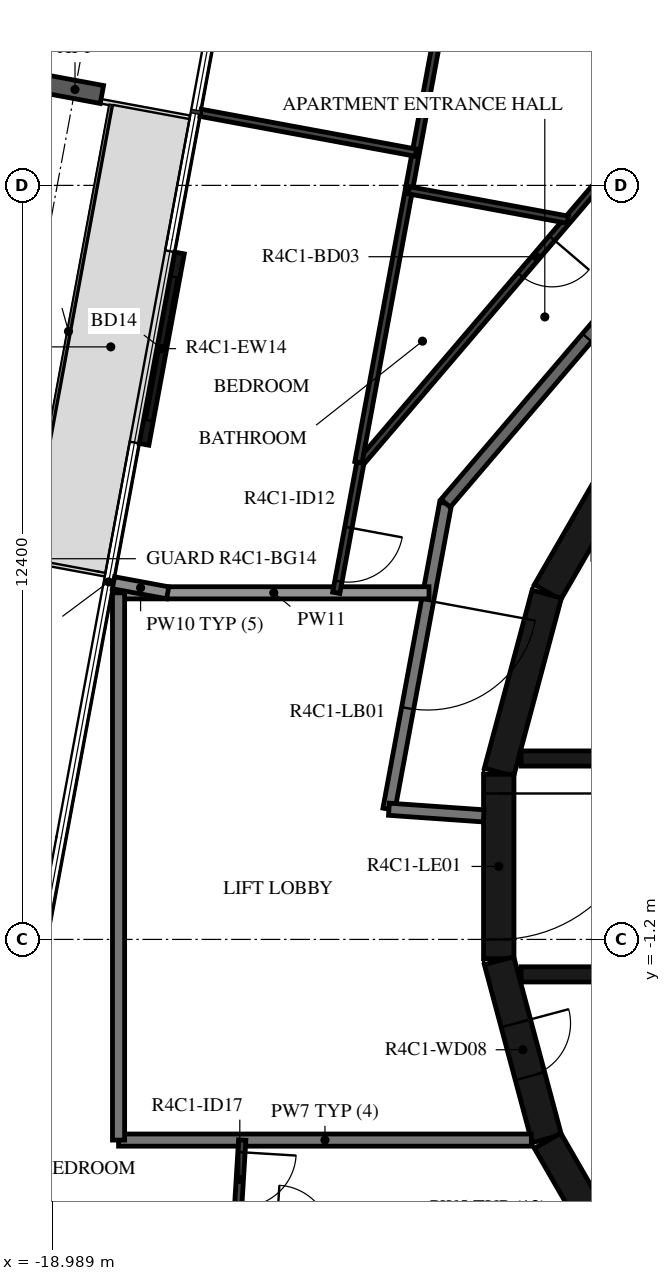
"""IFC4 building model, lengths in metres.
Left out: names, types, materials, properties, quantities, classifications, styles, units other than length and angle.
Written with IfcOpenShell. Run it as: python <this file> out.ifc"""

import sys

from ifc_helpers import new_model, si_unit, direction, frame, frame_2d, origin, origin_2d, place, context, subcontext, project, spatial, rectangle, i_section, extrude, element, fill, save


model = new_model("IFC4")
c1 = context("Model", 3, precision=1e-05, world=origin(), true_north=direction((0.0, 1.0)))
c2 = subcontext(c1, "Body", "Model", "MODEL_VIEW")
j1 = project(units=[si_unit("LENGTHUNIT", "METRE"), si_unit("PLANEANGLEUNIT", "RADIAN")], contexts=[c1])
p1 = place(None, origin())
s1 = spatial("IfcSite", under=j1, at=p1, CompositionType="ELEMENT")
p2 = place(p1, origin())
s2 = spatial("IfcBuilding", under=s1, at=p2, CompositionType="ELEMENT")
p3 = place(p2, frame((0.0, 0.0, 176.2)))
s3 = spatial("IfcBuildingStorey", under=s2, at=p3, CompositionType="ELEMENT", Elevation=176.2)
p4 = place(p3, frame((-18.616, 12.777, -0.38), z_axis=(0.0, 0.0, 1.0), x_axis=(0.182235967681, 0.983254825609, 0.0)))
e1 = element("IfcColumn", 1, at=p4, inside=s3, PredefinedType="COLUMN", context=c2, shape_type="SweptSolid", body=[
    extrude(i_section(OverallWidth=0.3, OverallDepth=0.9, WebThickness=0.019, FlangeThickness=0.035, FilletRadius=0.03, at=origin_2d()), origin(), (0.0, 0.0, 1.0), 3.5),
])
p5 = place(p3, frame((-16.897, 10.088, 0.0), z_axis=(0.0, 0.0, 1.0), x_axis=(-0.18226136951, -0.983250117307, 0.0)))
e2 = element("IfcWall", 2, at=p5, inside=s3, PredefinedType="STANDARD", context=c2, shape_type="SweptSolid", body=[
    extrude(rectangle(XDim=3.2, YDim=0.16, at=frame_2d((1.6, 0.0))), origin(), (0.0, 0.0, 1.0), 3.12),
])
p6 = place(p5, frame((0.4, 0.0, 0.0)))
e3 = element("IfcOpeningElement", 3, at=p6, cuts=e2, PredefinedType="OPENING", context=c2, shape_type="SweptSolid", body=[
    extrude(rectangle(XDim=2.4, YDim=2.4, at=frame_2d((1.2, 1.2))), frame((0.0, 0.09, 0.0), z_axis=(0.0, -1.0, 0.0), x_axis=(1.0, 0.0, 0.0)), (0.0, 0.0, 1.0), 0.18),
])
for number, where, z_axis, x_axis in (
    (4, (-9.329, 7.137, 0.0), (0.0, 0.0, 1.0), (-0.5, -0.866, 0.0)),
    (5, (-10.858, 4.479, 0.0), (0.0, 0.0, 1.0), (-0.259, -0.966, 0.0)),
):
    element("IfcWall", number, at=place(p3, frame(where, z_axis=z_axis, x_axis=x_axis)), inside=s3, PredefinedType="SHEAR", context=c2, shape_type="SweptSolid", body=[
        extrude(rectangle(XDim=3.033, YDim=0.5, at=frame_2d((1.516, 0.0))), origin(), (0.0, 0.0, 1.0), 3.12),
    ])
p7 = place(p3, frame((-11.647, 1.516, 0.0), z_axis=(0.0, 0.0, 1.0), x_axis=(0.0, -1.0, 0.0)))
e6 = element("IfcWall", 6, at=p7, inside=s3, PredefinedType="SHEAR", context=c2, shape_type="SweptSolid", body=[
    extrude(rectangle(XDim=3.033, YDim=0.5, at=frame_2d((1.516, 0.0))), origin(), (0.0, 0.0, 1.0), 3.12),
])
p8 = place(p7, frame((0.316, 0.0, 0.0)))
e7 = element("IfcOpeningElement", 7, at=p8, cuts=e6, PredefinedType="OPENING", context=c2, shape_type="SweptSolid", body=[
    extrude(rectangle(XDim=2.4, YDim=2.1, at=frame_2d((1.2, 1.05))), frame((0.0, 0.26, 0.0), z_axis=(0.0, -1.0, 0.0), x_axis=(1.0, 0.0, 0.0)), (0.0, 0.0, 1.0), 0.52),
])
p9 = place(p3, frame((-11.643, -1.55, 0.0), z_axis=(0.0, 0.0, 1.0), x_axis=(0.258734743916, -0.965948410781, 0.0)))
e8 = element("IfcWall", 8, at=p9, inside=s3, PredefinedType="SHEAR", context=c2, shape_type="SweptSolid", body=[
    extrude(rectangle(XDim=3.033, YDim=0.5, at=frame_2d((1.516, 0.0))), origin(), (0.0, 0.0, 1.0), 3.12),
])
p10 = place(p9, frame((1.066, 0.0, 0.0)))
e9 = element("IfcOpeningElement", 9, at=p10, cuts=e8, PredefinedType="OPENING", context=c2, shape_type="SweptSolid", body=[
    extrude(rectangle(XDim=0.9, YDim=2.1, at=frame_2d((0.45, 1.05))), frame((0.0, 0.26, 0.0), z_axis=(0.0, -1.0, 0.0), x_axis=(1.0, 0.0, 0.0)), (0.0, 0.0, 1.0), 0.52),
])
p11 = place(p3, frame((-10.845, -4.51, 0.0), z_axis=(0.0, 0.0, 1.0), x_axis=(0.500087131594, -0.865975092491, 0.0)))
e10 = element("IfcWall", 10, at=p11, inside=s3, PredefinedType="SHEAR", context=c2, shape_type="SweptSolid", body=[
    extrude(rectangle(XDim=3.033, YDim=0.5, at=frame_2d((1.516, 0.0))), origin(), (0.0, 0.0, 1.0), 3.12),
])
p12 = place(p3, frame((-11.28, 1.775, 0.0), z_axis=(0.0, 0.0, 1.0), x_axis=(1.0, 0.0, 0.0)))
e11 = element("IfcWall", 11, at=p12, inside=s3, PredefinedType="SHEAR", context=c2, shape_type="SweptSolid", body=[
    extrude(rectangle(XDim=14.38, YDim=0.25, at=frame_2d((7.19, 0.0))), origin(), (0.0, 0.0, 1.0), 3.12),
])
p13 = place(p12, frame((10.73, 0.0, 0.0)))
e12 = element("IfcOpeningElement", 12, at=p13, cuts=e11, PredefinedType="OPENING", context=c2, shape_type="SweptSolid", body=[
    extrude(rectangle(XDim=1.1, YDim=2.1, at=frame_2d((0.55, 1.05))), frame((0.0, 0.135, 0.0), z_axis=(0.0, -1.0, 0.0), x_axis=(1.0, 0.0, 0.0)), (0.0, 0.0, 1.0), 0.27),
])
p14 = place(p12, frame((12.88, 0.0, 0.0)))
e13 = element("IfcOpeningElement", 13, at=p14, cuts=e11, PredefinedType="OPENING", context=c2, shape_type="SweptSolid", body=[
    extrude(rectangle(XDim=1.1, YDim=2.1, at=frame_2d((0.55, 1.05))), frame((0.0, 0.135, 0.0), z_axis=(0.0, -1.0, 0.0), x_axis=(1.0, 0.0, 0.0)), (0.0, 0.0, 1.0), 0.27),
])
p15 = place(p12, frame((5.455, 0.0, 0.0)))
e14 = element("IfcOpeningElement", 14, at=p15, cuts=e11, PredefinedType="OPENING", context=c2, shape_type="SweptSolid", body=[
    extrude(rectangle(XDim=0.9, YDim=2.1, at=frame_2d((0.45, 1.05))), frame((0.0, 0.135, 0.0), z_axis=(0.0, -1.0, 0.0), x_axis=(1.0, 0.0, 0.0)), (0.0, 0.0, 1.0), 0.27),
])
p16 = place(p3, frame((-11.28, -1.775, 0.0), z_axis=(0.0, 0.0, 1.0), x_axis=(1.0, 0.0, 0.0)))
e15 = element("IfcWall", 15, at=p16, inside=s3, PredefinedType="SHEAR", context=c2, shape_type="SweptSolid", body=[
    extrude(rectangle(XDim=14.38, YDim=0.25, at=frame_2d((7.19, 0.0))), origin(), (0.0, 0.0, 1.0), 3.12),
])
p17 = place(p16, frame((12.88, 0.0, 0.0)))
e16 = element("IfcOpeningElement", 16, at=p17, cuts=e15, PredefinedType="OPENING", context=c2, shape_type="SweptSolid", body=[
    extrude(rectangle(XDim=1.1, YDim=2.1, at=frame_2d((0.55, 1.05))), frame((0.0, 0.135, 0.0), z_axis=(0.0, -1.0, 0.0), x_axis=(1.0, 0.0, 0.0)), (0.0, 0.0, 1.0), 0.27),
])
p18 = place(p16, frame((8.68, 0.0, 0.0)))
e17 = element("IfcOpeningElement", 17, at=p18, cuts=e15, PredefinedType="OPENING", context=c2, shape_type="SweptSolid", body=[
    extrude(rectangle(XDim=0.9, YDim=2.1, at=frame_2d((0.45, 1.05))), frame((0.0, 0.135, 0.0), z_axis=(0.0, -1.0, 0.0), x_axis=(1.0, 0.0, 0.0)), (0.0, 0.0, 1.0), 0.27),
])
p19 = place(p3, frame((-12.521, 5.972, 0.0), z_axis=(0.0, 0.0, 1.0), x_axis=(-0.182251559718, -0.983251935661, 0.0)))
e18 = element("IfcWall", 18, at=p19, inside=s3, PredefinedType="STANDARD", context=c2, shape_type="SweptSolid", body=[
    extrude(rectangle(XDim=5.117, YDim=0.2, at=frame_2d((2.559, 0.0))), origin(), (0.0, 0.0, 1.0), 3.12),
])
p20 = place(p19, frame((1.627, 0.0, 0.0)))
e19 = element("IfcOpeningElement", 19, at=p20, cuts=e18, PredefinedType="OPENING", context=c2, shape_type="SweptSolid", body=[
    extrude(rectangle(XDim=1.8, YDim=2.1, at=frame_2d((0.9, 1.05))), frame((0.0, 0.11, 0.0), z_axis=(0.0, -1.0, 0.0), x_axis=(1.0, 0.0, 0.0)), (0.0, 0.0, 1.0), 0.22),
])
p21 = place(p3, frame((-13.454, 0.941, 0.0), z_axis=(0.0, 0.0, 1.0), x_axis=(0.99755155062, -0.069934997354, 0.0)))
e20 = element("IfcWall", 20, at=p21, inside=s3, PredefinedType="STANDARD", context=c2, shape_type="SweptSolid", body=[
    extrude(rectangle(XDim=1.561, YDim=0.2, at=frame_2d((0.78, 0.0))), origin(), (0.0, 0.0, 1.0), 3.12),
])
p22 = place(p3, frame((-7.858, 11.433, 0.0), z_axis=(0.0, 0.0, 1.0), x_axis=(-0.649440801937, -0.760412154545, 0.0)))
e21 = element("IfcWall", 21, at=p22, inside=s3, PredefinedType="STANDARD", context=c2, shape_type="SweptSolid", body=[
    extrude(rectangle(XDim=7.181, YDim=0.2, at=frame_2d((3.59, 0.0))), origin(), (0.0, 0.0, 1.0), 3.12),
])
p23 = place(p22, frame((2.6, 0.0, 0.0)))
e22 = element("IfcOpeningElement", 22, at=p23, cuts=e21, PredefinedType="OPENING", context=c2, shape_type="SweptSolid", body=[
    extrude(rectangle(XDim=1.0, YDim=2.1, at=frame_2d((0.5, 1.05))), frame((0.0, 0.11, 0.0), z_axis=(0.0, -1.0, 0.0), x_axis=(1.0, 0.0, 0.0)), (0.0, 0.0, 1.0), 0.22),
])
p24 = place(p3, frame((-12.794, 4.5, 0.0), z_axis=(0.0, 0.0, 1.0), x_axis=(-1.0, 0.0, 0.0)))
e23 = element("IfcWall", 23, at=p24, inside=s3, PredefinedType="STANDARD", context=c2, shape_type="SweptSolid", body=[
    extrude(rectangle(XDim=5.106, YDim=0.2, at=frame_2d((2.553, 0.0))), origin(), (0.0, 0.0, 1.0), 2.73),
])
p25 = place(p3, frame((-17.9, -4.5, 0.0), z_axis=(0.0, 0.0, 1.0), x_axis=(1.0, 0.0, 0.0)))
e24 = element("IfcWall", 24, at=p25, inside=s3, PredefinedType="STANDARD", context=c2, shape_type="SweptSolid", body=[
    extrude(rectangle(XDim=6.789, YDim=0.2, at=frame_2d((3.394, 0.0))), origin(), (0.0, 0.0, 1.0), 3.12),
])
p26 = place(p3, frame((-17.9, 4.5, 0.0), z_axis=(0.0, 0.0, 1.0), x_axis=(0.0, -1.0, 0.0)))
e25 = element("IfcWall", 25, at=p26, inside=s3, PredefinedType="STANDARD", context=c2, shape_type="SweptSolid", body=[
    extrude(rectangle(XDim=9.0, YDim=0.2, at=frame_2d((4.5, 0.0))), origin(), (0.0, 0.0, 1.0), 3.12),
])
p27 = place(p3, frame((-17.984, 4.665, 0.0), z_axis=(0.0, 0.0, 1.0), x_axis=(0.98328378843, -0.182079629313, 0.0)))
e26 = element("IfcWall", 26, at=p27, inside=s3, PredefinedType="STANDARD", context=c2, shape_type="SweptSolid", body=[
    extrude(rectangle(XDim=0.908, YDim=0.2, at=frame_2d((0.454, 0.0))), origin(), (0.0, 0.0, 1.0), 2.73),
])
p28 = place(p3, frame((-8.774, 12.669, 0.0), z_axis=(0.0, 0.0, 1.0), x_axis=(-0.649446157105, -0.760407580855, 0.0)))
e27 = element("IfcWall", 27, at=p28, inside=s3, PredefinedType="PARTITIONING", context=c2, shape_type="SweptSolid", body=[
    extrude(rectangle(XDim=7.927, YDim=0.12, at=frame_2d((3.964, 0.0))), origin(), (0.0, 0.0, 1.0), 3.12),
])
p29 = place(p28, frame((3.074, 0.0, 0.0)))
e28 = element("IfcOpeningElement", 28, at=p29, cuts=e27, PredefinedType="OPENING", context=c2, shape_type="SweptSolid", body=[
    extrude(rectangle(XDim=0.8, YDim=2.1, at=frame_2d((0.4, 1.05))), frame((0.0, 0.07, 0.0), z_axis=(0.0, -1.0, 0.0), x_axis=(1.0, 0.0, 0.0)), (0.0, 0.0, 1.0), 0.14),
])
p30 = place(p3, frame((-13.923, 6.641, 0.0), z_axis=(0.0, 0.0, 1.0), x_axis=(-0.182209715759, -0.983259690765, 0.0)))
e29 = element("IfcWall", 29, at=p30, inside=s3, PredefinedType="PARTITIONING", context=c2, shape_type="SweptSolid", body=[
    extrude(rectangle(XDim=2.177, YDim=0.12, at=frame_2d((1.089, 0.0))), origin(), (0.0, 0.0, 1.0), 3.12),
])
p31 = place(p30, frame((1.083, 0.0, 0.0)))
e30 = element("IfcOpeningElement", 30, at=p31, cuts=e29, PredefinedType="OPENING", context=c2, shape_type="SweptSolid", body=[
    extrude(rectangle(XDim=0.9, YDim=2.1, at=frame_2d((0.45, 1.05))), frame((0.0, 0.07, 0.0), z_axis=(0.0, -1.0, 0.0), x_axis=(1.0, 0.0, 0.0)), (0.0, 0.0, 1.0), 0.14),
])
p32 = place(p3, frame((-13.955, 6.647, 0.0), z_axis=(0.0, 0.0, 1.0), x_axis=(0.182264522222, 0.983249532896, 0.0)))
e31 = element("IfcWall", 31, at=p32, inside=s3, PredefinedType="PARTITIONING", context=c2, shape_type="SweptSolid", body=[
    extrude(rectangle(XDim=4.589, YDim=0.12, at=frame_2d((2.294, 0.0))), origin(), (0.0, 0.0, 1.0), 3.12),
])
p33 = place(p3, frame((-11.396, 20.453, 0.0), z_axis=(0.0, 0.0, 1.0), x_axis=(-0.182223370439, -0.983257160292, 0.0)))
e32 = element("IfcWall", 32, at=p33, inside=s3, PredefinedType="PARTITIONING", context=c2, shape_type="SweptSolid", body=[
    extrude(rectangle(XDim=9.452, YDim=0.12, at=frame_2d((4.726, 0.0))), origin(), (0.0, 0.0, 1.0), 3.12),
])
p34 = place(p33, frame((3.319, 0.0, 0.0)))
e33 = element("IfcOpeningElement", 33, at=p34, cuts=e32, PredefinedType="OPENING", context=c2, shape_type="SweptSolid", body=[
    extrude(rectangle(XDim=0.9, YDim=2.1, at=frame_2d((0.45, 1.05))), frame((0.0, 0.07, 0.0), z_axis=(0.0, -1.0, 0.0), x_axis=(1.0, 0.0, 0.0)), (0.0, 0.0, 1.0), 0.14),
])
p35 = place(p33, frame((0.2, 0.0, 0.0)))
e34 = element("IfcOpeningElement", 34, at=p35, cuts=e32, PredefinedType="OPENING", context=c2, shape_type="SweptSolid", body=[
    extrude(rectangle(XDim=0.9, YDim=2.1, at=frame_2d((0.45, 1.05))), frame((0.0, 0.07, 0.0), z_axis=(0.0, -1.0, 0.0), x_axis=(1.0, 0.0, 0.0)), (0.0, 0.0, 1.0), 0.14),
])
p36 = place(p3, frame((-13.126, 11.12, 0.0), z_axis=(0.0, 0.0, 1.0), x_axis=(0.983257646361, -0.182220747645, 0.0)))
e35 = element("IfcWall", 35, at=p36, inside=s3, PredefinedType="PARTITIONING", context=c2, shape_type="SweptSolid", body=[
    extrude(rectangle(XDim=2.659, YDim=0.12, at=frame_2d((1.33, 0.0))), origin(), (0.0, 0.0, 1.0), 3.12),
])
p37 = place(p3, frame((-16.552, 12.394, 0.0), z_axis=(0.0, 0.0, 1.0), x_axis=(0.983257712156, -0.182220392618, 0.0)))
e36 = element("IfcWall", 36, at=p37, inside=s3, PredefinedType="PARTITIONING", context=c2, shape_type="SweptSolid", body=[
    extrude(rectangle(XDim=3.6, YDim=0.12, at=frame_2d((1.8, 0.0))), origin(), (0.0, 0.0, 1.0), 2.73),
])
p38 = place(p3, frame((-15.866, -4.5, 0.0), z_axis=(0.0, 0.0, 1.0), x_axis=(-0.060986374837, -0.998138598635, 0.0)))
e37 = element("IfcWall", 37, at=p38, inside=s3, PredefinedType="PARTITIONING", context=c2, shape_type="SweptSolid", body=[
    extrude(rectangle(XDim=1.605, YDim=0.12, at=frame_2d((0.803, 0.0))), origin(), (0.0, 0.0, 1.0), 3.12),
])
p39 = place(p38, frame((0.2, 0.0, 0.0)))
e38 = element("IfcOpeningElement", 38, at=p39, cuts=e37, PredefinedType="OPENING", context=c2, shape_type="SweptSolid", body=[
    extrude(rectangle(XDim=0.9, YDim=2.1, at=frame_2d((0.45, 1.05))), frame((0.0, 0.07, 0.0), z_axis=(0.0, -1.0, 0.0), x_axis=(1.0, 0.0, 0.0)), (0.0, 0.0, 1.0), 0.14),
])
p40 = place(p6, origin())
e39 = element("IfcDoor", 39, at=p40, inside=s3, OperationType="DOUBLE_DOOR_SLIDING", PredefinedType="DOOR", context=c2, shape_type="SweptSolid", body=[
    extrude(rectangle(XDim=2.4, YDim=2.4, at=frame_2d((1.2, 1.2))), frame((0.0, 0.025, 0.0), z_axis=(0.0, -1.0, 0.0), x_axis=(1.0, 0.0, 0.0)), (0.0, 0.0, 1.0), 0.05),
])
fill(e3, e39)
p41 = place(p8, origin())
e40 = element("IfcDoor", 40, at=p41, inside=s3, OperationType="DOUBLE_DOOR_SINGLE_SWING", PredefinedType="DOOR", context=c2, shape_type="SweptSolid", body=[
    extrude(rectangle(XDim=2.4, YDim=2.1, at=frame_2d((1.2, 1.05))), frame((0.0, 0.025, 0.0), z_axis=(0.0, -1.0, 0.0), x_axis=(1.0, 0.0, 0.0)), (0.0, 0.0, 1.0), 0.05),
])
fill(e7, e40)
p42 = place(p10, origin())
e41 = element("IfcDoor", 41, at=p42, inside=s3, OperationType="SINGLE_SWING_RIGHT", PredefinedType="DOOR", context=c2, shape_type="SweptSolid", body=[
    extrude(rectangle(XDim=0.9, YDim=2.1, at=frame_2d((0.45, 1.05))), frame((0.0, 0.025, 0.0), z_axis=(0.0, -1.0, 0.0), x_axis=(1.0, 0.0, 0.0)), (0.0, 0.0, 1.0), 0.05),
])
fill(e9, e41)
p43 = place(p23, origin())
e42 = element("IfcDoor", 42, at=p43, inside=s3, OperationType="SINGLE_SWING_LEFT", PredefinedType="DOOR", context=c2, shape_type="SweptSolid", body=[
    extrude(rectangle(XDim=1.0, YDim=2.1, at=frame_2d((0.5, 1.05))), frame((0.0, 0.025, 0.0), z_axis=(0.0, -1.0, 0.0), x_axis=(1.0, 0.0, 0.0)), (0.0, 0.0, 1.0), 0.05),
])
fill(e22, e42)
p44 = place(p29, origin())
e43 = element("IfcDoor", 43, at=p44, inside=s3, OperationType="SINGLE_SWING_LEFT", PredefinedType="DOOR", context=c2, shape_type="SweptSolid", body=[
    extrude(rectangle(XDim=0.8, YDim=2.1, at=frame_2d((0.4, 1.05))), frame((0.0, 0.025, 0.0), z_axis=(0.0, -1.0, 0.0), x_axis=(1.0, 0.0, 0.0)), (0.0, 0.0, 1.0), 0.05),
])
fill(e28, e43)
p45 = place(p31, origin())
e44 = element("IfcDoor", 44, at=p45, inside=s3, OperationType="SINGLE_SWING_LEFT", PredefinedType="DOOR", context=c2, shape_type="SweptSolid", body=[
    extrude(rectangle(XDim=0.9, YDim=2.1, at=frame_2d((0.45, 1.05))), frame((0.0, 0.025, 0.0), z_axis=(0.0, -1.0, 0.0), x_axis=(1.0, 0.0, 0.0)), (0.0, 0.0, 1.0), 0.05),
])
fill(e30, e44)
p46 = place(p39, origin())
e45 = element("IfcDoor", 45, at=p46, inside=s3, OperationType="SINGLE_SWING_RIGHT", PredefinedType="DOOR", context=c2, shape_type="SweptSolid", body=[
    extrude(rectangle(XDim=0.9, YDim=2.1, at=frame_2d((0.45, 1.05))), frame((0.0, 0.025, 0.0), z_axis=(0.0, -1.0, 0.0), x_axis=(1.0, 0.0, 0.0)), (0.0, 0.0, 1.0), 0.05),
])
fill(e38, e45)
p47 = place(p20, origin())
e46 = element("IfcDoor", 46, at=p47, inside=s3, OperationType="DOUBLE_DOOR_SINGLE_SWING", PredefinedType="DOOR", context=c2, shape_type="SweptSolid", body=[
    extrude(rectangle(XDim=1.8, YDim=2.1, at=frame_2d((0.9, 1.05))), frame((0.0, 0.025, 0.0), z_axis=(0.0, -1.0, 0.0), x_axis=(1.0, 0.0, 0.0)), (0.0, 0.0, 1.0), 0.05),
])
fill(e19, e46)
save(model, sys.argv[1])
